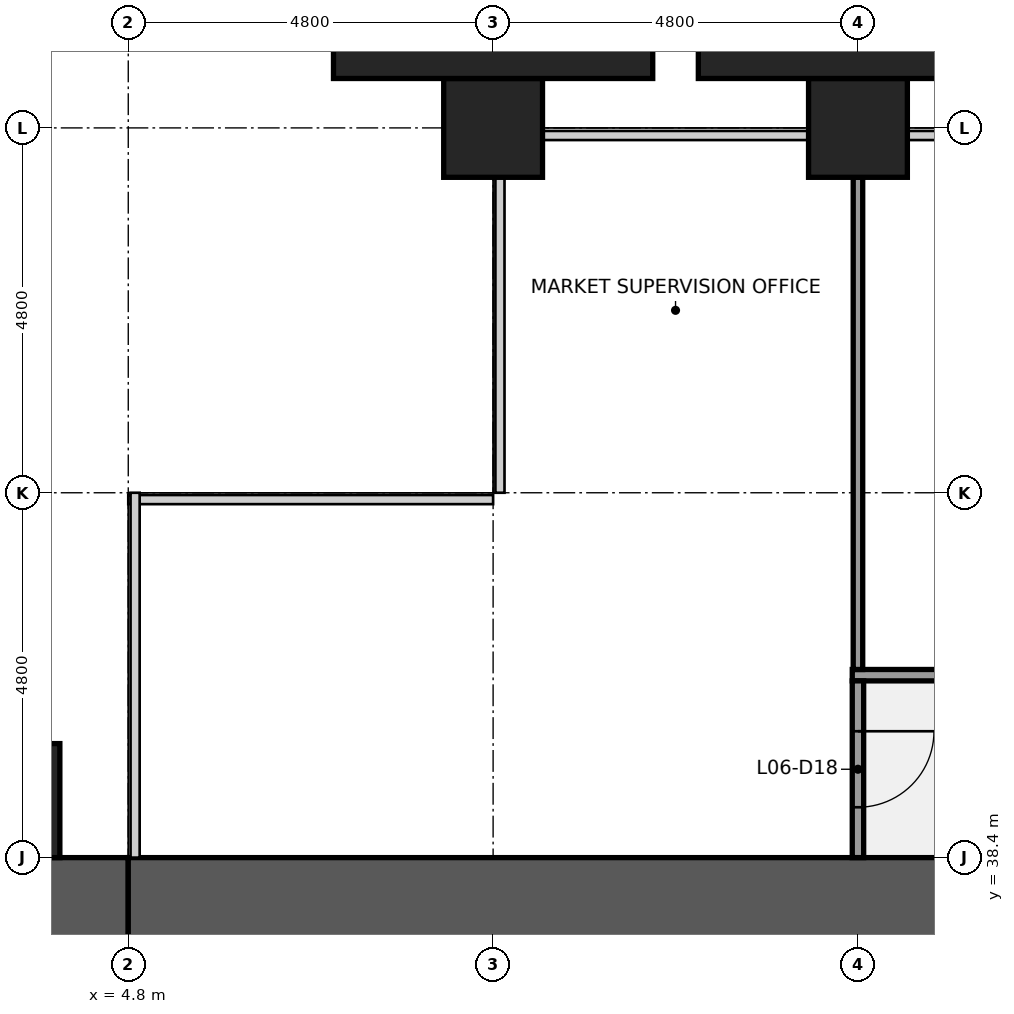
"""IFC4 building model, lengths in metres.
Left out: names, types, materials, properties, quantities, classifications, styles, units other than length and angle.
Written with IfcOpenShell. Run it as: python <this file> out.ifc"""

import sys

from ifc_helpers import new_model, si_unit, direction, frame, frame_2d, origin, origin_2d, place, context, subcontext, project, spatial, rectangle, extrude, element, fill, save


model = new_model("IFC4")
c1 = context("Model", 3, precision=1e-05, world=origin(), true_north=direction((0.0, 1.0)))
c2 = subcontext(c1, "Body", "Model", "MODEL_VIEW")
j1 = project(units=[si_unit("LENGTHUNIT", "METRE"), si_unit("PLANEANGLEUNIT", "RADIAN")], contexts=[c1])
p1 = place(None, origin())
s1 = spatial("IfcSite", under=j1, at=p1, CompositionType="ELEMENT")
p2 = place(p1, origin())
s2 = spatial("IfcBuilding", under=s1, at=p2, CompositionType="ELEMENT")
p3 = place(p2, frame((0.0, 0.0, 34.6)))
s3 = spatial("IfcBuildingStorey", under=s2, at=p3, CompositionType="ELEMENT", Elevation=34.6)
for number, where, z_axis, x_axis in (
    (1, (9.6, 48.0, 0.0), (0.0, 0.0, 1.0), (1.0, 0.0, 0.0)),
    (2, (14.4, 48.0, 0.0), (0.0, 0.0, 1.0), (1.0, 0.0, 0.0)),
):
    element("IfcColumn", number, at=place(p3, frame(where, z_axis=z_axis, x_axis=x_axis)), inside=s3, PredefinedType="COLUMN", context=c2, shape_type="SweptSolid", body=[
        extrude(rectangle(XDim=1.3, YDim=1.3, at=origin_2d()), origin(), (0.0, 0.0, 1.0), 4.4),
    ])
p4 = place(p3, frame((1.2, 37.8, 0.0), z_axis=(0.0, 0.0, 1.0), x_axis=(1.0, 0.0, 0.0)))
e3 = element("IfcWall", 3, at=p4, inside=s3, PredefinedType="SHEAR", context=c2, shape_type="SweptSolid", body=[
    extrude(rectangle(XDim=3.6, YDim=1.2, at=frame_2d((1.8, 0.0))), origin(), (0.0, 0.0, 1.0), 4.24),
])
p5 = place(p3, frame((4.8, 37.8, 0.0), z_axis=(0.0, 0.0, 1.0), x_axis=(1.0, 0.0, 0.0)))
e4 = element("IfcWall", 4, at=p5, inside=s3, PredefinedType="SHEAR", context=c2, shape_type="SweptSolid", body=[
    extrude(rectangle(XDim=13.2, YDim=1.2, at=frame_2d((6.6, 0.0))), origin(), (0.0, 0.0, 1.0), 4.24),
])
p6 = place(p5, frame((11.45, 0.0, 0.0)))
e5 = element("IfcOpeningElement", 5, at=p6, cuts=e4, PredefinedType="OPENING", context=c2, shape_type="SweptSolid", body=[
    extrude(rectangle(XDim=1.1, YDim=2.1, at=frame_2d((0.55, 1.05))), frame((0.0, 0.61, 0.0), z_axis=(0.0, -1.0, 0.0), x_axis=(1.0, 0.0, 0.0)), (0.0, 0.0, 1.0), 1.22),
])
p7 = place(p3, frame((14.325, 40.8, 0.0), z_axis=(0.0, 0.0, 1.0), x_axis=(1.0, 0.0, 0.0)))
e6 = element("IfcWall", 6, at=p7, inside=s3, PredefinedType="PARTITIONING", context=c2, shape_type="SweptSolid", body=[
    extrude(rectangle(XDim=4.95, YDim=0.15, at=frame_2d((2.475, 0.0))), origin(), (0.0, 0.0, 1.0), 3.27),
])
p8 = place(p7, frame((1.975, 0.0, 0.0)))
e7 = element("IfcOpeningElement", 7, at=p8, cuts=e6, PredefinedType="OPENING", context=c2, shape_type="SweptSolid", body=[
    extrude(rectangle(XDim=1.0, YDim=2.1, at=frame_2d((0.5, 1.05))), frame((0.0, 0.085, 0.0), z_axis=(0.0, -1.0, 0.0), x_axis=(1.0, 0.0, 0.0)), (0.0, 0.0, 1.0), 0.17),
])
p9 = place(p3, frame((14.4, 40.875, 0.0), z_axis=(0.0, 0.0, 1.0), x_axis=(0.0, 1.0, 0.0)))
e8 = element("IfcWall", 8, at=p9, inside=s3, PredefinedType="PARTITIONING", context=c2, shape_type="SweptSolid", body=[
    extrude(rectangle(XDim=6.475, YDim=0.125, at=frame_2d((3.238, 0.0))), origin(), (0.0, 0.0, 1.0), 3.27),
])
p10 = place(p3, frame((14.4, 38.4, 0.0), z_axis=(0.0, 0.0, 1.0), x_axis=(0.0, 1.0, 0.0)))
e9 = element("IfcWall", 9, at=p10, inside=s3, PredefinedType="PARTITIONING", context=c2, shape_type="SweptSolid", body=[
    extrude(rectangle(XDim=2.325, YDim=0.15, at=frame_2d((1.163, 0.0))), origin(), (0.0, 0.0, 1.0), 3.27),
])
p11 = place(p10, frame((0.663, 0.0, 0.0)))
e10 = element("IfcOpeningElement", 10, at=p11, cuts=e9, PredefinedType="OPENING", context=c2, shape_type="SweptSolid", body=[
    extrude(rectangle(XDim=1.0, YDim=2.1, at=frame_2d((0.5, 1.05))), frame((0.0, 0.085, 0.0), z_axis=(0.0, -1.0, 0.0), x_axis=(1.0, 0.0, 0.0)), (0.0, 0.0, 1.0), 0.17),
])
p12 = place(p3, frame((2.4, 39.15, 0.0), z_axis=(0.0, 0.0, 1.0), x_axis=(1.0, 0.0, 0.0)))
e11 = element("IfcColumn", 11, at=p12, inside=s3, PredefinedType="PILASTER", context=c2, shape_type="SweptSolid", body=[
    extrude(rectangle(XDim=3.0, YDim=1.5, at=origin_2d()), origin(), (0.0, 0.0, 1.0), 4.4),
])
for number, where, z_axis, x_axis in (
    (12, (9.6, 49.075, 0.0), (0.0, 0.0, 1.0), (1.0, 0.0, 0.0)),
    (13, (14.4, 49.075, 0.0), (0.0, 0.0, 1.0), (1.0, 0.0, 0.0)),
):
    element("IfcColumn", number, at=place(p3, frame(where, z_axis=z_axis, x_axis=x_axis)), inside=s3, PredefinedType="PILASTER", context=c2, shape_type="SweptSolid", body=[
        extrude(rectangle(XDim=4.2, YDim=0.85, at=origin_2d()), origin(), (0.0, 0.0, 1.0), 4.4),
    ])
p13 = place(p11, origin())
e14 = element("IfcDoor", 14, at=p13, inside=s3, OperationType="SINGLE_SWING_RIGHT", PredefinedType="DOOR", context=c2, shape_type="SweptSolid", body=[
    extrude(rectangle(XDim=1.0, YDim=2.1, at=frame_2d((0.5, 1.05))), frame((0.0, 0.025, 0.0), z_axis=(0.0, -1.0, 0.0), x_axis=(1.0, 0.0, 0.0)), (0.0, 0.0, 1.0), 0.05),
])
fill(e10, e14)
save(model, sys.argv[1])
